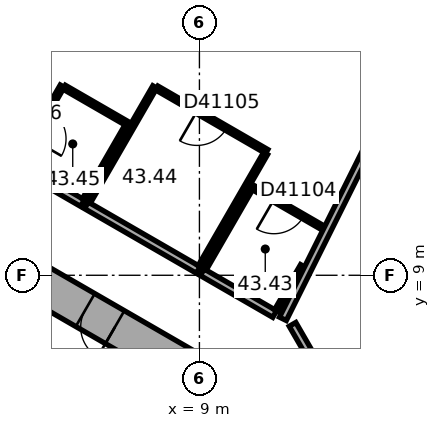
"""IFC4 building model, lengths in metres.
Left out: names, types, materials, properties, quantities, classifications, styles, units other than length and angle.
Written with IfcOpenShell. Run it as: python <this file> out.ifc"""

import sys

from ifc_helpers import new_model, si_unit, direction, frame, frame_2d, origin, place, context, subcontext, project, spatial, rectangle, extrude, element, fill, save


model = new_model("IFC4")
c1 = context("Model", 3, precision=1e-05, world=origin(), true_north=direction((0.0, 1.0)))
c2 = subcontext(c1, "Body", "Model", "MODEL_VIEW")
j1 = project(units=[si_unit("LENGTHUNIT", "METRE"), si_unit("PLANEANGLEUNIT", "RADIAN")], contexts=[c1])
p1 = place(None, origin())
s1 = spatial("IfcSite", under=j1, at=p1, CompositionType="ELEMENT")
p2 = place(p1, origin())
s2 = spatial("IfcBuilding", under=s1, at=p2, CompositionType="ELEMENT")
p3 = place(p2, frame((0.0, 0.0, 176.2)))
s3 = spatial("IfcBuildingStorey", under=s2, at=p3, CompositionType="ELEMENT", Elevation=176.2)
p4 = place(p3, frame((10.25, 5.629, 0.0), z_axis=(0.0, 0.0, 1.0), x_axis=(-0.866022616891, 0.50000482701, 0.0)))
e1 = element("IfcWall", 1, at=p4, inside=s3, PredefinedType="SHEAR", context=c2, shape_type="SweptSolid", body=[
    extrude(rectangle(XDim=12.125, YDim=1.0, at=frame_2d((6.062, 0.0))), origin(), (0.0, 0.0, 1.0), 3.7),
])
p5 = place(p4, frame((4.012, 0.0, 0.0)))
e2 = element("IfcOpeningElement", 2, at=p5, cuts=e1, PredefinedType="OPENING", context=c2, shape_type="SweptSolid", body=[
    extrude(rectangle(XDim=0.9, YDim=2.1, at=frame_2d((0.45, 1.05))), frame((0.0, 0.51, 0.0), z_axis=(0.0, -1.0, 0.0), x_axis=(1.0, 0.0, 0.0)), (0.0, 0.0, 1.0), 1.02),
])
p6 = place(p4, frame((7.912, 0.0, 0.0)))
e3 = element("IfcOpeningElement", 3, at=p6, cuts=e1, PredefinedType="OPENING", context=c2, shape_type="SweptSolid", body=[
    extrude(rectangle(XDim=0.9, YDim=2.1, at=frame_2d((0.45, 1.05))), frame((0.0, 0.51, 0.0), z_axis=(0.0, -1.0, 0.0), x_axis=(1.0, 0.0, 0.0)), (0.0, 0.0, 1.0), 1.02),
])
p7 = place(p3, frame((19.464, 14.599, 0.0), z_axis=(0.0, 0.0, 1.0), x_axis=(-0.894935755043, 0.446195018289, 0.0)))
e4 = element("IfcWall", 4, at=p7, inside=s3, PredefinedType="STANDARD", context=c2, shape_type="SweptSolid", body=[
    extrude(rectangle(XDim=20.044, YDim=0.2, at=frame_2d((10.022, 0.0))), origin(), (0.0, 0.0, 1.0), 3.7),
])
p8 = place(p7, frame((1.313, 0.0, 0.9)))
e5 = element("IfcOpeningElement", 5, at=p8, cuts=e4, PredefinedType="OPENING", context=c2, shape_type="SweptSolid", body=[
    extrude(rectangle(XDim=2.4, YDim=2.0, at=frame_2d((1.2, 1.0))), frame((0.0, 0.11, 0.0), z_axis=(0.0, -1.0, 0.0), x_axis=(1.0, 0.0, 0.0)), (0.0, 0.0, 1.0), 0.22),
])
p9 = place(p7, frame((5.067, 0.0, 0.9)))
e6 = element("IfcOpeningElement", 6, at=p9, cuts=e4, PredefinedType="OPENING", context=c2, shape_type="SweptSolid", body=[
    extrude(rectangle(XDim=2.4, YDim=2.0, at=frame_2d((1.2, 1.0))), frame((0.0, 0.11, 0.0), z_axis=(0.0, -1.0, 0.0), x_axis=(1.0, 0.0, 0.0)), (0.0, 0.0, 1.0), 0.22),
])
p10 = place(p7, frame((8.821, 0.0, 0.9)))
e7 = element("IfcOpeningElement", 7, at=p10, cuts=e4, PredefinedType="OPENING", context=c2, shape_type="SweptSolid", body=[
    extrude(rectangle(XDim=2.4, YDim=2.0, at=frame_2d((1.2, 1.0))), frame((0.0, 0.11, 0.0), z_axis=(0.0, -1.0, 0.0), x_axis=(1.0, 0.0, 0.0)), (0.0, 0.0, 1.0), 0.22),
])
p11 = place(p7, frame((12.575, 0.0, 0.9)))
e8 = element("IfcOpeningElement", 8, at=p11, cuts=e4, PredefinedType="OPENING", context=c2, shape_type="SweptSolid", body=[
    extrude(rectangle(XDim=2.4, YDim=2.0, at=frame_2d((1.2, 1.0))), frame((0.0, 0.11, 0.0), z_axis=(0.0, -1.0, 0.0), x_axis=(1.0, 0.0, 0.0)), (0.0, 0.0, 1.0), 0.22),
])
p12 = place(p7, frame((16.329, 0.0, 0.9)))
e9 = element("IfcOpeningElement", 9, at=p12, cuts=e4, PredefinedType="OPENING", context=c2, shape_type="SweptSolid", body=[
    extrude(rectangle(XDim=2.4, YDim=2.0, at=frame_2d((1.2, 1.0))), frame((0.0, 0.11, 0.0), z_axis=(0.0, -1.0, 0.0), x_axis=(1.0, 0.0, 0.0)), (0.0, 0.0, 1.0), 0.22),
])
p13 = place(p3, frame((7.424, 4.259, 0.0), z_axis=(0.0, 0.0, 1.0), x_axis=(-0.866026010844, 0.49999894854, 0.0)))
e10 = element("IfcWall", 10, at=p13, inside=s3, PredefinedType="PARTITIONING", context=c2, shape_type="SweptSolid", body=[
    extrude(rectangle(XDim=8.0, YDim=0.2, at=frame_2d((4.0, 0.0))), origin(), (0.0, 0.0, 1.0), 3.42),
])
p14 = place(p3, frame((6.303, 4.617, 0.0), z_axis=(0.0, 0.0, 1.0), x_axis=(-0.866027801685, 0.499995846692, 0.0)))
e11 = element("IfcWall", 11, at=p14, inside=s3, PredefinedType="SHEAR", context=c2, shape_type="SweptSolid", body=[
    extrude(rectangle(XDim=7.06, YDim=0.3, at=frame_2d((3.53, 0.0))), origin(), (0.0, 0.0, 1.0), 3.42),
])
p15 = place(p3, frame((4.24, 11.986, 0.0), z_axis=(0.0, 0.0, 1.0), x_axis=(0.499952165731, 0.866053019151, 0.0)))
e12 = element("IfcWall", 12, at=p15, inside=s3, PredefinedType="PARTITIONING", context=c2, shape_type="SweptSolid", body=[
    extrude(rectangle(XDim=2.3, YDim=0.12, at=frame_2d((1.15, 0.0))), origin(), (0.0, 0.0, 1.0), 3.42),
])
p16 = place(p15, frame((0.7, 0.0, 0.0)))
e13 = element("IfcOpeningElement", 13, at=p16, cuts=e12, PredefinedType="OPENING", context=c2, shape_type="SweptSolid", body=[
    extrude(rectangle(XDim=0.9, YDim=2.1, at=frame_2d((0.45, 1.05))), frame((0.0, 0.07, 0.0), z_axis=(0.0, -1.0, 0.0), x_axis=(1.0, 0.0, 0.0)), (0.0, 0.0, 1.0), 0.14),
])
p17 = place(p3, frame((5.442, 13.948, 0.0), z_axis=(0.0, 0.0, 1.0), x_axis=(0.866043088465, -0.499969367985, 0.0)))
e14 = element("IfcWall", 14, at=p17, inside=s3, PredefinedType="PARTITIONING", context=c2, shape_type="SweptSolid", body=[
    extrude(rectangle(XDim=1.94, YDim=0.12, at=frame_2d((0.97, 0.0))), origin(), (0.0, 0.0, 1.0), 3.42),
])
p18 = place(p3, frame((5.922, 10.899, 0.0), z_axis=(0.0, 0.0, 1.0), x_axis=(-0.866031556924, 0.499989342298, 0.0)))
e15 = element("IfcWall", 15, at=p18, inside=s3, PredefinedType="PARTITIONING", context=c2, shape_type="SweptSolid", body=[
    extrude(rectangle(XDim=5.701, YDim=0.2, at=frame_2d((2.851, 0.0))), origin(), (0.0, 0.0, 1.0), 3.42),
])
p19 = place(p3, frame((6.076, 10.926, 0.0), z_axis=(0.0, 0.0, 1.0), x_axis=(0.500010275428, 0.866019471182, 0.0)))
e16 = element("IfcWall", 16, at=p19, inside=s3, PredefinedType="PARTITIONING", context=c2, shape_type="SweptSolid", body=[
    extrude(rectangle(XDim=3.5, YDim=0.12, at=frame_2d((1.75, 0.0))), origin(), (0.0, 0.0, 1.0), 3.42),
])
p20 = place(p3, frame((7.092, 12.926, 0.0), z_axis=(0.0, 0.0, 1.0), x_axis=(-0.500030632641, -0.866007717299, 0.0)))
e17 = element("IfcWall", 17, at=p20, inside=s3, PredefinedType="PARTITIONING", context=c2, shape_type="SweptSolid", body=[
    extrude(rectangle(XDim=2.24, YDim=0.12, at=frame_2d((1.12, 0.0))), origin(), (0.0, 0.0, 1.0), 3.42),
])
p21 = place(p3, frame((7.878, 13.927, 0.0), z_axis=(0.0, 0.0, 1.0), x_axis=(0.866021245731, -0.500007201891, 0.0)))
e18 = element("IfcWall", 18, at=p21, inside=s3, PredefinedType="PARTITIONING", context=c2, shape_type="SweptSolid", body=[
    extrude(rectangle(XDim=3.34, YDim=0.12, at=frame_2d((1.67, 0.0))), origin(), (0.0, 0.0, 1.0), 3.42),
])
p22 = place(p21, frame((1.22, 0.0, 0.0)))
e19 = element("IfcOpeningElement", 19, at=p22, cuts=e18, PredefinedType="OPENING", context=c2, shape_type="SweptSolid", body=[
    extrude(rectangle(XDim=0.9, YDim=2.1, at=frame_2d((0.45, 1.05))), frame((0.0, 0.07, 0.0), z_axis=(0.0, -1.0, 0.0), x_axis=(1.0, 0.0, 0.0)), (0.0, 0.0, 1.0), 0.14),
])
p23 = place(p3, frame((8.971, 9.139, 0.0), z_axis=(0.0, 0.0, 1.0), x_axis=(-0.866038511948, 0.499977295307, 0.0)))
e20 = element("IfcWall", 20, at=p23, inside=s3, PredefinedType="PARTITIONING", context=c2, shape_type="SweptSolid", body=[
    extrude(rectangle(XDim=3.4, YDim=0.2, at=frame_2d((1.7, 0.0))), origin(), (0.0, 0.0, 1.0), 3.42),
])
p24 = place(p3, frame((9.125, 9.166, 0.0), z_axis=(0.0, 0.0, 1.0), x_axis=(0.500004234368, 0.866022959057, 0.0)))
e21 = element("IfcWall", 21, at=p24, inside=s3, PredefinedType="PARTITIONING", context=c2, shape_type="SweptSolid", body=[
    extrude(rectangle(XDim=2.5, YDim=0.12, at=frame_2d((1.25, 0.0))), origin(), (0.0, 0.0, 1.0), 3.42),
])
p25 = place(p3, frame((10.427, 11.301, 0.0), z_axis=(0.0, 0.0, 1.0), x_axis=(0.866019511163, -0.500010206181, 0.0)))
e22 = element("IfcWall", 22, at=p25, inside=s3, PredefinedType="PARTITIONING", context=c2, shape_type="SweptSolid", body=[
    extrude(rectangle(XDim=2.13, YDim=0.12, at=frame_2d((1.065, 0.0))), origin(), (0.0, 0.0, 1.0), 3.42),
])
p26 = place(p25, frame((0.615, 0.0, 0.0)))
e23 = element("IfcOpeningElement", 23, at=p26, cuts=e22, PredefinedType="OPENING", context=c2, shape_type="SweptSolid", body=[
    extrude(rectangle(XDim=0.9, YDim=2.1, at=frame_2d((0.45, 1.05))), frame((0.0, 0.07, 0.0), z_axis=(0.0, -1.0, 0.0), x_axis=(1.0, 0.0, 0.0)), (0.0, 0.0, 1.0), 0.14),
])
p27 = place(p3, frame((10.74, 12.205, 0.0), z_axis=(0.0, 0.0, 1.0), x_axis=(-0.499978425106, -0.866037859697, 0.0)))
e24 = element("IfcWall", 24, at=p27, inside=s3, PredefinedType="PARTITIONING", context=c2, shape_type="SweptSolid", body=[
    extrude(rectangle(XDim=3.44, YDim=0.12, at=frame_2d((1.72, 0.0))), origin(), (0.0, 0.0, 1.0), 3.42),
])
p28 = place(p3, frame((10.98, 7.979, 0.0), z_axis=(0.0, 0.0, 1.0), x_axis=(-0.866008176907, 0.50002983664, 0.0)))
e25 = element("IfcWall", 25, at=p28, inside=s3, PredefinedType="PARTITIONING", context=c2, shape_type="SweptSolid", body=[
    extrude(rectangle(XDim=2.2, YDim=0.2, at=frame_2d((1.1, 0.0))), origin(), (0.0, 0.0, 1.0), 3.42),
])
p29 = place(p3, frame((11.714, 9.25, 0.0), z_axis=(0.0, 0.0, 1.0), x_axis=(-0.500015945769, -0.866016197294, 0.0)))
e26 = element("IfcWall", 26, at=p29, inside=s3, PredefinedType="PARTITIONING", context=c2, shape_type="SweptSolid", body=[
    extrude(rectangle(XDim=1.368, YDim=0.12, at=frame_2d((0.684, 0.0))), origin(), (0.0, 0.0, 1.0), 3.42),
])
p30 = place(p3, frame((12.38, 6.097, 0.0), z_axis=(0.0, 0.0, 1.0), x_axis=(-0.499964847546, 0.866045698112, 0.0)))
e27 = element("IfcWall", 27, at=p30, inside=s3, PredefinedType="PARTITIONING", context=c2, shape_type="SweptSolid", body=[
    extrude(rectangle(XDim=1.86, YDim=0.2, at=frame_2d((0.93, 0.0))), origin(), (0.0, 0.0, 1.0), 3.42),
])
p31 = place(p3, frame((15.09, 15.663, 0.0), z_axis=(0.0, 0.0, 1.0), x_axis=(-0.446206011687, -0.894930273895, 0.0)))
e28 = element("IfcWall", 28, at=p31, inside=s3, PredefinedType="PARTITIONING", context=c2, shape_type="SweptSolid", body=[
    extrude(rectangle(XDim=8.725, YDim=0.2, at=frame_2d((4.363, 0.0))), origin(), (0.0, 0.0, 1.0), 3.42),
])
p32 = place(p5, origin())
e29 = element("IfcDoor", 29, at=p32, inside=s3, OperationType="SINGLE_SWING_LEFT", PredefinedType="DOOR", context=c2, shape_type="SweptSolid", body=[
    extrude(rectangle(XDim=0.9, YDim=2.1, at=frame_2d((0.45, 1.05))), frame((0.0, 0.025, 0.0), z_axis=(0.0, -1.0, 0.0), x_axis=(1.0, 0.0, 0.0)), (0.0, 0.0, 1.0), 0.05),
])
fill(e2, e29)
p33 = place(p26, origin())
e30 = element("IfcDoor", 30, at=p33, inside=s3, OperationType="SINGLE_SWING_LEFT", PredefinedType="DOOR", context=c2, shape_type="SweptSolid", body=[
    extrude(rectangle(XDim=0.9, YDim=2.1, at=frame_2d((0.45, 1.05))), frame((0.0, 0.025, 0.0), z_axis=(0.0, -1.0, 0.0), x_axis=(1.0, 0.0, 0.0)), (0.0, 0.0, 1.0), 0.05),
])
fill(e23, e30)
p34 = place(p22, origin())
e31 = element("IfcDoor", 31, at=p34, inside=s3, OperationType="SINGLE_SWING_LEFT", PredefinedType="DOOR", context=c2, shape_type="SweptSolid", body=[
    extrude(rectangle(XDim=0.9, YDim=2.1, at=frame_2d((0.45, 1.05))), frame((0.0, 0.025, 0.0), z_axis=(0.0, -1.0, 0.0), x_axis=(1.0, 0.0, 0.0)), (0.0, 0.0, 1.0), 0.05),
])
fill(e19, e31)
save(model, sys.argv[1])
